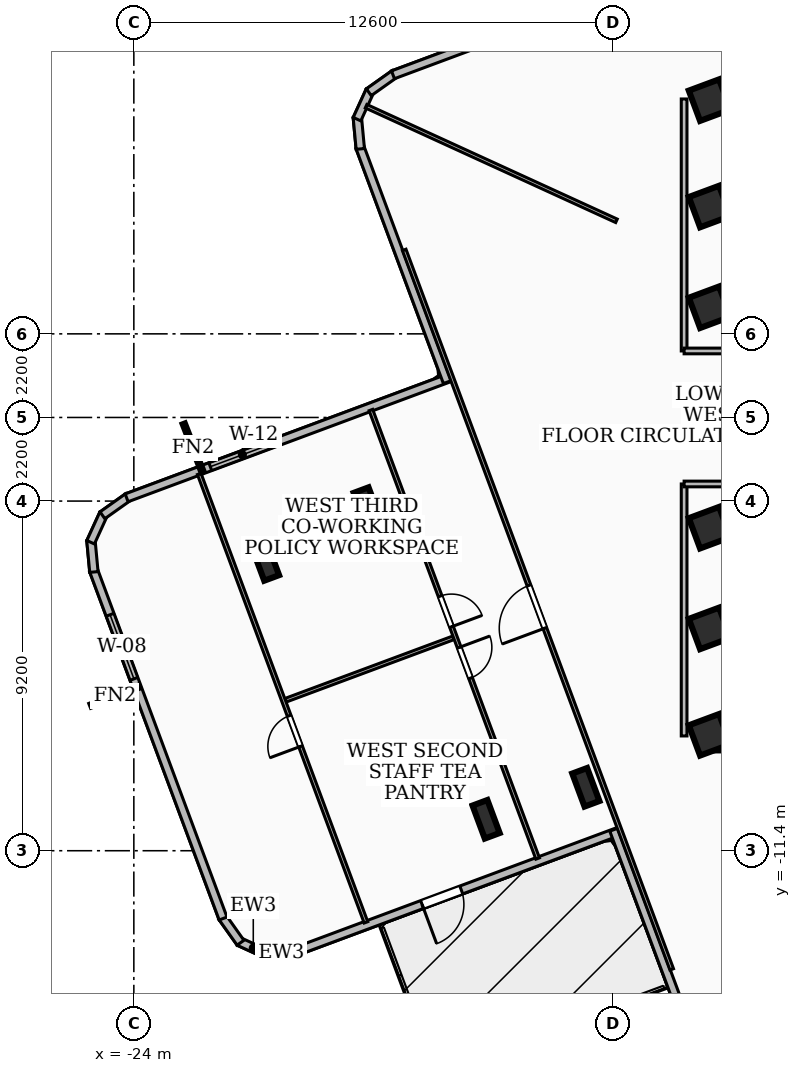
"""IFC4 building model, lengths in metres.
Left out: names, types, materials, properties, quantities, classifications, styles, units other than length and angle.
Written with IfcOpenShell. Run it as: python <this file> out.ifc"""

import sys

from ifc_helpers import new_model, si_unit, direction, frame, frame_2d, origin, origin_2d, place, context, subcontext, project, spatial, rectangle, i_section, extrude, element, fill, save


model = new_model("IFC4")
c1 = context("Model", 3, precision=1e-05, world=origin(), true_north=direction((0.0, 1.0)))
c2 = subcontext(c1, "Body", "Model", "MODEL_VIEW")
j1 = project(units=[si_unit("LENGTHUNIT", "METRE"), si_unit("PLANEANGLEUNIT", "RADIAN")], contexts=[c1])
p1 = place(None, origin())
s1 = spatial("IfcSite", under=j1, at=p1, CompositionType="ELEMENT")
p2 = place(p1, origin())
s2 = spatial("IfcBuilding", under=s1, at=p2, CompositionType="ELEMENT")
p3 = place(p2, frame((0.0, 0.0, 166.68)))
s3 = spatial("IfcBuildingStorey", under=s2, at=p3, CompositionType="ELEMENT", Elevation=166.68)
for number, where, z_axis, x_axis in (
    (1, (-8.78, 8.535, 0.0), (0.0, 0.0, 1.0), (1.0, 0.0, 0.0)),
    (2, (8.78, -8.535, 0.0), (0.0, 0.0, 1.0), (-1.0, 0.0, 0.0)),
):
    element("IfcWall", number, at=place(p3, frame(where, z_axis=z_axis, x_axis=x_axis)), inside=s3, PredefinedType="SHEAR", context=c2, shape_type="SweptSolid", body=[
        extrude(rectangle(XDim=17.56, YDim=0.45, at=frame_2d((8.78, 0.0))), origin(), (0.0, 0.0, 1.0), 3.34),
    ])
for number, where, z_axis, x_axis in (
    (3, (-8.85, -5.55, 0.0), (0.0, 0.0, 1.0), (0.937, 0.349, 0.0)),
    (4, (-8.85, -2.9, 0.0), (0.0, 0.0, 1.0), (0.937, 0.349, 0.0)),
    (5, (-8.85, 2.9, 0.0), (0.0, 0.0, 1.0), (0.937, 0.349, 0.0)),
    (6, (-8.85, 5.55, 0.0), (0.0, 0.0, 1.0), (0.937, 0.349, 0.0)),
    (7, (-8.85, 8.35, 0.0), (0.0, 0.0, 1.0), (0.937, 0.349, 0.0)),
    (8, (-8.85, -8.35, 0.0), (0.0, 0.0, 1.0), (0.937, 0.349, 0.0)),
):
    element("IfcColumn", number, at=place(p3, frame(where, z_axis=z_axis, x_axis=x_axis)), inside=s3, PredefinedType="COLUMN", context=c2, shape_type="SweptSolid", body=[
        extrude(rectangle(XDim=0.85, YDim=0.85, at=origin_2d()), origin(), (0.0, 0.0, 1.0), 3.6),
    ])
for number, where, z_axis, x_axis in (
    (9, (-17.858, -2.346, 0.0), (0.0, 0.0, 1.0), (0.937, 0.349, 0.0)),
    (10, (-12.106, -9.731, 0.0), (0.0, 0.0, 1.0), (0.937, 0.349, 0.0)),
    (11, (-20.535, -3.788, 0.0), (0.0, 0.0, 1.0), (0.937, 0.349, 0.0)),
    (12, (-14.731, -10.573, 0.0), (0.0, 0.0, 1.0), (0.937, 0.349, 0.0)),
):
    element("IfcColumn", number, at=place(p3, frame(where, z_axis=z_axis, x_axis=x_axis)), inside=s3, PredefinedType="COLUMN", context=c2, shape_type="SweptSolid", body=[
        extrude(i_section(OverallWidth=0.418, OverallDepth=0.927, WebThickness=0.019, FlangeThickness=0.032, at=origin_2d()), origin(), (0.0, 0.0, 1.0), 3.6),
    ])
p4 = place(p3, frame((-11.26, -10.898, 0.0), z_axis=(0.0, 0.0, 1.0), x_axis=(-0.937248687931, -0.348661579431, 0.0)))
e13 = element("IfcWall", 13, at=p4, inside=s3, PredefinedType="SOLIDWALL", context=c2, shape_type="SweptSolid", body=[
    extrude(rectangle(XDim=9.057, YDim=0.22, at=frame_2d((4.529, 0.0))), origin(), (0.0, 0.0, 1.0), 2.72),
])
p5 = place(p4, frame((4.4, 0.0, 0.0)))
e14 = element("IfcOpeningElement", 14, at=p5, cuts=e13, PredefinedType="OPENING", context=c2, shape_type="SweptSolid", body=[
    extrude(rectangle(XDim=1.1, YDim=2.1, at=frame_2d((0.55, 1.05))), frame((0.0, 0.12, 0.0), z_axis=(0.0, -1.0, 0.0), x_axis=(1.0, 0.0, 0.0)), (0.0, 0.0, 1.0), 0.24),
])
p6 = place(p3, frame((-19.701, -14.045, 0.0), z_axis=(0.0, 0.0, 1.0), x_axis=(-0.99561041007, -0.093594398126, 0.0)))
e15 = element("IfcWall", 15, at=p6, inside=s3, PredefinedType="SOLIDWALL", context=c2, shape_type="SweptSolid", body=[
    extrude(rectangle(XDim=0.835, YDim=0.22, at=frame_2d((0.417, 0.0))), origin(), (0.0, 0.0, 1.0), 3.34),
])
p7 = place(p3, frame((-20.484, -14.131, 0.0), z_axis=(0.0, 0.0, 1.0), x_axis=(-0.909927497245, 0.41476734413, 0.0)))
e16 = element("IfcWall", 16, at=p7, inside=s3, PredefinedType="SOLIDWALL", context=c2, shape_type="SweptSolid", body=[
    extrude(rectangle(XDim=0.82, YDim=0.22, at=frame_2d((0.41, 0.0))), origin(), (0.0, 0.0, 1.0), 3.34),
])
p8 = place(p3, frame((-21.193, -13.821, 0.0), z_axis=(0.0, 0.0, 1.0), x_axis=(-0.578269277984, 0.815845967165, 0.0)))
e17 = element("IfcWall", 17, at=p8, inside=s3, PredefinedType="SOLIDWALL", context=c2, shape_type="SweptSolid", body=[
    extrude(rectangle(XDim=0.833, YDim=0.22, at=frame_2d((0.417, 0.0))), origin(), (0.0, 0.0, 1.0), 3.34),
])
p9 = place(p3, frame((-21.652, -13.184, 0.0), z_axis=(0.0, 0.0, 1.0), x_axis=(-0.348670987183, 0.937245188143, 0.0)))
e18 = element("IfcWall", 18, at=p9, inside=s3, PredefinedType="SOLIDWALL", context=c2, shape_type="SweptSolid", body=[
    extrude(rectangle(XDim=9.78, YDim=0.22, at=frame_2d((4.89, 0.0))), origin(), (0.0, 0.0, 1.0), 3.34),
])
p10 = place(p9, frame((6.728, 0.0, 0.85)))
e19 = element("IfcOpeningElement", 19, at=p10, cuts=e18, PredefinedType="OPENING", context=c2, shape_type="SweptSolid", body=[
    extrude(rectangle(XDim=1.8, YDim=1.8, at=frame_2d((0.9, 0.9))), frame((0.0, 0.12, 0.0), z_axis=(0.0, -1.0, 0.0), x_axis=(1.0, 0.0, 0.0)), (0.0, 0.0, 1.0), 0.24),
])
p11 = place(p3, frame((-25.051, -4.066, 0.0), z_axis=(0.0, 0.0, 1.0), x_axis=(-0.093331645357, 0.995635075705, 0.0)))
e20 = element("IfcWall", 20, at=p11, inside=s3, PredefinedType="SOLIDWALL", context=c2, shape_type="SweptSolid", body=[
    extrude(rectangle(XDim=0.834, YDim=0.22, at=frame_2d((0.417, 0.0))), origin(), (0.0, 0.0, 1.0), 3.34),
])
p12 = place(p3, frame((-25.137, -3.283, 0.0), z_axis=(0.0, 0.0, 1.0), x_axis=(0.415865283719, 0.909426228892, 0.0)))
e21 = element("IfcWall", 21, at=p12, inside=s3, PredefinedType="SOLIDWALL", context=c2, shape_type="SweptSolid", body=[
    extrude(rectangle(XDim=0.82, YDim=0.22, at=frame_2d((0.41, 0.0))), origin(), (0.0, 0.0, 1.0), 3.34),
])
p13 = place(p3, frame((-24.826, -2.574, 0.0), z_axis=(0.0, 0.0, 1.0), x_axis=(0.815453569677, 0.578822490666, 0.0)))
e22 = element("IfcWall", 22, at=p13, inside=s3, PredefinedType="SOLIDWALL", context=c2, shape_type="SweptSolid", body=[
    extrude(rectangle(XDim=0.833, YDim=0.22, at=frame_2d((0.416, 0.0))), origin(), (0.0, 0.0, 1.0), 3.34),
])
p14 = place(p3, frame((-24.19, -2.115, 0.0), z_axis=(0.0, 0.0, 1.0), x_axis=(0.937261793021, 0.34862634918, 0.0)))
e23 = element("IfcWall", 23, at=p14, inside=s3, PredefinedType="SOLIDWALL", context=c2, shape_type="SweptSolid", body=[
    extrude(rectangle(XDim=9.058, YDim=0.22, at=frame_2d((4.529, 0.0))), origin(), (0.0, 0.0, 1.0), 3.34),
])
p15 = place(p14, frame((2.35, 0.0, 0.85)))
e24 = element("IfcOpeningElement", 24, at=p15, cuts=e23, PredefinedType="OPENING", context=c2, shape_type="SweptSolid", body=[
    extrude(rectangle(XDim=1.8, YDim=1.6, at=frame_2d((0.9, 0.8))), frame((0.0, 0.12, 0.0), z_axis=(0.0, -1.0, 0.0), x_axis=(1.0, 0.0, 0.0)), (0.0, 0.0, 1.0), 0.24),
])
p16 = place(p3, frame((-15.751, 0.93, 0.0), z_axis=(0.0, 0.0, 1.0), x_axis=(-0.348729932868, 0.937223257246, 0.0)))
e25 = element("IfcWall", 25, at=p16, inside=s3, PredefinedType="SOLIDWALL", context=c2, shape_type="SweptSolid", body=[
    extrude(rectangle(XDim=6.598, YDim=0.22, at=frame_2d((3.299, 0.0))), origin(), (0.0, 0.0, 1.0), 3.34),
])
p17 = place(p3, frame((-18.041, 7.066, 0.0), z_axis=(0.0, 0.0, 1.0), x_axis=(-0.09330446586, 0.995637623159, 0.0)))
e26 = element("IfcWall", 26, at=p17, inside=s3, PredefinedType="SOLIDWALL", context=c2, shape_type="SweptSolid", body=[
    extrude(rectangle(XDim=0.835, YDim=0.22, at=frame_2d((0.417, 0.0))), origin(), (0.0, 0.0, 1.0), 3.34),
])
p18 = place(p3, frame((-18.127, 7.849, 0.0), z_axis=(0.0, 0.0, 1.0), x_axis=(0.415083126143, 0.909783489843, 0.0)))
e27 = element("IfcWall", 27, at=p18, inside=s3, PredefinedType="SOLIDWALL", context=c2, shape_type="SweptSolid", body=[
    extrude(rectangle(XDim=0.819, YDim=0.22, at=frame_2d((0.409, 0.0))), origin(), (0.0, 0.0, 1.0), 3.34),
])
p19 = place(p3, frame((-17.817, 8.557, 0.0), z_axis=(0.0, 0.0, 1.0), x_axis=(0.815315167698, 0.579017424022, 0.0)))
e28 = element("IfcWall", 28, at=p19, inside=s3, PredefinedType="SOLIDWALL", context=c2, shape_type="SweptSolid", body=[
    extrude(rectangle(XDim=0.833, YDim=0.22, at=frame_2d((0.417, 0.0))), origin(), (0.0, 0.0, 1.0), 3.34),
])
p20 = place(p3, frame((-17.181, 9.016, 0.0), z_axis=(0.0, 0.0, 1.0), x_axis=(0.937216908499, 0.34874699486, 0.0)))
e29 = element("IfcWall", 29, at=p20, inside=s3, PredefinedType="SOLIDWALL", context=c2, shape_type="SweptSolid", body=[
    extrude(rectangle(XDim=6.758, YDim=0.22, at=frame_2d((3.379, 0.0))), origin(), (0.0, 0.0, 1.0), 3.34),
])
p21 = place(p3, frame((-9.016, -17.181, 0.0), z_axis=(0.0, 0.0, 1.0), x_axis=(-0.34874699486, 0.937216908499, 0.0)))
e30 = element("IfcWall", 30, at=p21, inside=s3, PredefinedType="SOLIDWALL", context=c2, shape_type="SweptSolid", body=[
    extrude(rectangle(XDim=6.758, YDim=0.22, at=frame_2d((3.379, 0.0))), origin(), (0.0, 0.0, 1.0), 2.72),
])
p22 = place(p3, frame((-9.52, 1.75, 0.0), z_axis=(0.0, 0.0, 1.0), x_axis=(0.0, 1.0, 0.0)))
e31 = element("IfcWall", 31, at=p22, inside=s3, PredefinedType="PARTITIONING", context=c2, shape_type="SweptSolid", body=[
    extrude(rectangle(XDim=6.63, YDim=0.15, at=frame_2d((3.315, 0.0))), origin(), (0.0, 0.0, 1.0), 3.34),
])
p23 = place(p3, frame((-7.85, 1.75, 0.0), z_axis=(0.0, 0.0, 1.0), x_axis=(-1.0, 0.0, 0.0)))
e32 = element("IfcWall", 32, at=p23, inside=s3, PredefinedType="PARTITIONING", context=c2, shape_type="SweptSolid", body=[
    extrude(rectangle(XDim=1.67, YDim=0.15, at=frame_2d((0.835, 0.0))), origin(), (0.0, 0.0, 1.0), 2.57),
])
p24 = place(p3, frame((-9.52, -8.38, 0.0), z_axis=(0.0, 0.0, 1.0), x_axis=(0.0, 1.0, 0.0)))
e33 = element("IfcWall", 33, at=p24, inside=s3, PredefinedType="PARTITIONING", context=c2, shape_type="SweptSolid", body=[
    extrude(rectangle(XDim=6.63, YDim=0.15, at=frame_2d((3.315, 0.0))), origin(), (0.0, 0.0, 1.0), 2.644),
])
p25 = place(p3, frame((-7.85, -1.75, 0.0), z_axis=(0.0, 0.0, 1.0), x_axis=(-1.0, 0.0, 0.0)))
e34 = element("IfcWall", 34, at=p25, inside=s3, PredefinedType="PARTITIONING", context=c2, shape_type="SweptSolid", body=[
    extrude(rectangle(XDim=1.67, YDim=0.15, at=frame_2d((0.835, 0.0))), origin(), (0.0, 0.0, 1.0), 2.57),
])
p26 = place(p3, frame((-11.3, 5.174, 0.0), z_axis=(0.0, 0.0, 1.0), x_axis=(-0.909275268701, 0.416195249528, 0.0)))
e35 = element("IfcWall", 35, at=p26, inside=s3, PredefinedType="PARTITIONING", context=c2, shape_type="SweptSolid", body=[
    extrude(rectangle(XDim=7.246, YDim=0.1, at=frame_2d((3.623, 0.0))), origin(), (0.0, 0.0, 1.0), 3.34),
])
p27 = place(p3, frame((-9.846, -14.522, 0.0), z_axis=(0.0, 0.0, 1.0), x_axis=(-0.348543090668, 0.937292757866, 0.0)))
e36 = element("IfcWall", 36, at=p27, inside=s3, PredefinedType="PARTITIONING", context=c2, shape_type="SweptSolid", body=[
    extrude(rectangle(XDim=20.198, YDim=0.1, at=frame_2d((10.099, 0.0))), origin(), (0.0, 0.0, 1.0), 2.644),
])
p28 = place(p27, frame((9.579, 0.0, 0.0)))
e37 = element("IfcOpeningElement", 37, at=p28, cuts=e36, PredefinedType="OPENING", context=c2, shape_type="SweptSolid", body=[
    extrude(rectangle(XDim=1.2, YDim=2.1, at=frame_2d((0.6, 1.05))), frame((0.0, 0.06, 0.0), z_axis=(0.0, -1.0, 0.0), x_axis=(1.0, 0.0, 0.0)), (0.0, 0.0, 1.0), 0.12),
])
p29 = place(p3, frame((-15.596, -5.8, 0.0), z_axis=(0.0, 0.0, 1.0), x_axis=(-0.937258557626, -0.348635047229, 0.0)))
e38 = element("IfcWall", 38, at=p29, inside=s3, PredefinedType="PARTITIONING", context=c2, shape_type="SweptSolid", body=[
    extrude(rectangle(XDim=4.701, YDim=0.1, at=frame_2d((2.351, 0.0))), origin(), (0.0, 0.0, 1.0), 2.793),
])
p30 = place(p3, frame((-17.762, 0.196, 0.0), z_axis=(0.0, 0.0, 1.0), x_axis=(0.348514653153, -0.937303332192, 0.0)))
e39 = element("IfcWall", 39, at=p30, inside=s3, PredefinedType="PARTITIONING", context=c2, shape_type="SweptSolid", body=[
    extrude(rectangle(XDim=12.59, YDim=0.1, at=frame_2d((6.295, 0.0))), origin(), (0.0, 0.0, 1.0), 2.644),
])
p31 = place(p30, frame((5.225, 0.0, 0.0)))
e40 = element("IfcOpeningElement", 40, at=p31, cuts=e39, PredefinedType="OPENING", context=c2, shape_type="SweptSolid", body=[
    extrude(rectangle(XDim=0.86, YDim=2.04, at=frame_2d((0.43, 1.02))), frame((0.0, 0.06, 0.0), z_axis=(0.0, -1.0, 0.0), x_axis=(1.0, 0.0, 0.0)), (0.0, 0.0, 1.0), 0.12),
])
p32 = place(p30, frame((6.665, 0.0, 0.0)))
e41 = element("IfcOpeningElement", 41, at=p32, cuts=e39, PredefinedType="OPENING", context=c2, shape_type="SweptSolid", body=[
    extrude(rectangle(XDim=0.86, YDim=2.04, at=frame_2d((0.43, 1.02))), frame((0.0, 0.06, 0.0), z_axis=(0.0, -1.0, 0.0), x_axis=(1.0, 0.0, 0.0)), (0.0, 0.0, 1.0), 0.12),
])
p33 = place(p3, frame((-17.892, -13.285, 0.0), z_axis=(0.0, 0.0, 1.0), x_axis=(-0.348514653153, 0.937303332192, 0.0)))
e42 = element("IfcWall", 42, at=p33, inside=s3, PredefinedType="PARTITIONING", context=c2, shape_type="SweptSolid", body=[
    extrude(rectangle(XDim=12.59, YDim=0.1, at=frame_2d((6.295, 0.0))), origin(), (0.0, 0.0, 1.0), 3.34),
])
p34 = place(p33, frame((4.94, 0.0, 0.0)))
e43 = element("IfcOpeningElement", 43, at=p34, cuts=e42, PredefinedType="OPENING", context=c2, shape_type="SweptSolid", body=[
    extrude(rectangle(XDim=0.86, YDim=2.04, at=frame_2d((0.43, 1.02))), frame((0.0, 0.06, 0.0), z_axis=(0.0, -1.0, 0.0), x_axis=(1.0, 0.0, 0.0)), (0.0, 0.0, 1.0), 0.12),
])
p35 = place(p5, origin())
e44 = element("IfcDoor", 44, at=p35, inside=s3, OperationType="SINGLE_SWING_RIGHT", PredefinedType="DOOR", context=c2, shape_type="SweptSolid", body=[
    extrude(rectangle(XDim=1.1, YDim=2.1, at=frame_2d((0.55, 1.05))), frame((0.0, 0.025, 0.0), z_axis=(0.0, -1.0, 0.0), x_axis=(1.0, 0.0, 0.0)), (0.0, 0.0, 1.0), 0.05),
])
fill(e14, e44)
p36 = place(p10, origin())
e45 = element("IfcWindow", 45, at=p36, inside=s3, PartitioningType="SINGLE_PANEL", PredefinedType="WINDOW", context=c2, shape_type="SweptSolid", body=[
    extrude(rectangle(XDim=1.8, YDim=1.8, at=frame_2d((0.9, 0.9))), frame((0.0, 0.03, 0.0), z_axis=(0.0, -1.0, 0.0), x_axis=(1.0, 0.0, 0.0)), (0.0, 0.0, 1.0), 0.06),
])
fill(e19, e45)
p37 = place(p15, origin())
e46 = element("IfcWindow", 46, at=p37, inside=s3, PartitioningType="SINGLE_PANEL", PredefinedType="WINDOW", context=c2, shape_type="SweptSolid", body=[
    extrude(rectangle(XDim=1.8, YDim=1.6, at=frame_2d((0.9, 0.8))), frame((0.0, 0.03, 0.0), z_axis=(0.0, -1.0, 0.0), x_axis=(1.0, 0.0, 0.0)), (0.0, 0.0, 1.0), 0.06),
])
fill(e24, e46)
p38 = place(p28, origin())
e47 = element("IfcDoor", 47, at=p38, inside=s3, OperationType="SINGLE_SWING_LEFT", PredefinedType="DOOR", context=c2, shape_type="SweptSolid", body=[
    extrude(rectangle(XDim=1.2, YDim=2.1, at=frame_2d((0.6, 1.05))), frame((0.0, 0.025, 0.0), z_axis=(0.0, -1.0, 0.0), x_axis=(1.0, 0.0, 0.0)), (0.0, 0.0, 1.0), 0.05),
])
fill(e37, e47)
p39 = place(p31, origin())
e48 = element("IfcDoor", 48, at=p39, inside=s3, OperationType="SINGLE_SWING_RIGHT", PredefinedType="DOOR", context=c2, shape_type="SweptSolid", body=[
    extrude(rectangle(XDim=0.86, YDim=2.04, at=frame_2d((0.43, 1.02))), frame((0.0, 0.025, 0.0), z_axis=(0.0, -1.0, 0.0), x_axis=(1.0, 0.0, 0.0)), (0.0, 0.0, 1.0), 0.05),
])
fill(e40, e48)
p40 = place(p32, origin())
e49 = element("IfcDoor", 49, at=p40, inside=s3, OperationType="SINGLE_SWING_LEFT", PredefinedType="DOOR", context=c2, shape_type="SweptSolid", body=[
    extrude(rectangle(XDim=0.86, YDim=2.04, at=frame_2d((0.43, 1.02))), frame((0.0, 0.025, 0.0), z_axis=(0.0, -1.0, 0.0), x_axis=(1.0, 0.0, 0.0)), (0.0, 0.0, 1.0), 0.05),
])
fill(e41, e49)
p41 = place(p34, origin())
e50 = element("IfcDoor", 50, at=p41, inside=s3, OperationType="SINGLE_SWING_LEFT", PredefinedType="DOOR", context=c2, shape_type="SweptSolid", body=[
    extrude(rectangle(XDim=0.86, YDim=2.04, at=frame_2d((0.43, 1.02))), frame((0.0, 0.025, 0.0), z_axis=(0.0, -1.0, 0.0), x_axis=(1.0, 0.0, 0.0)), (0.0, 0.0, 1.0), 0.05),
])
fill(e43, e50)
save(model, sys.argv[1])
